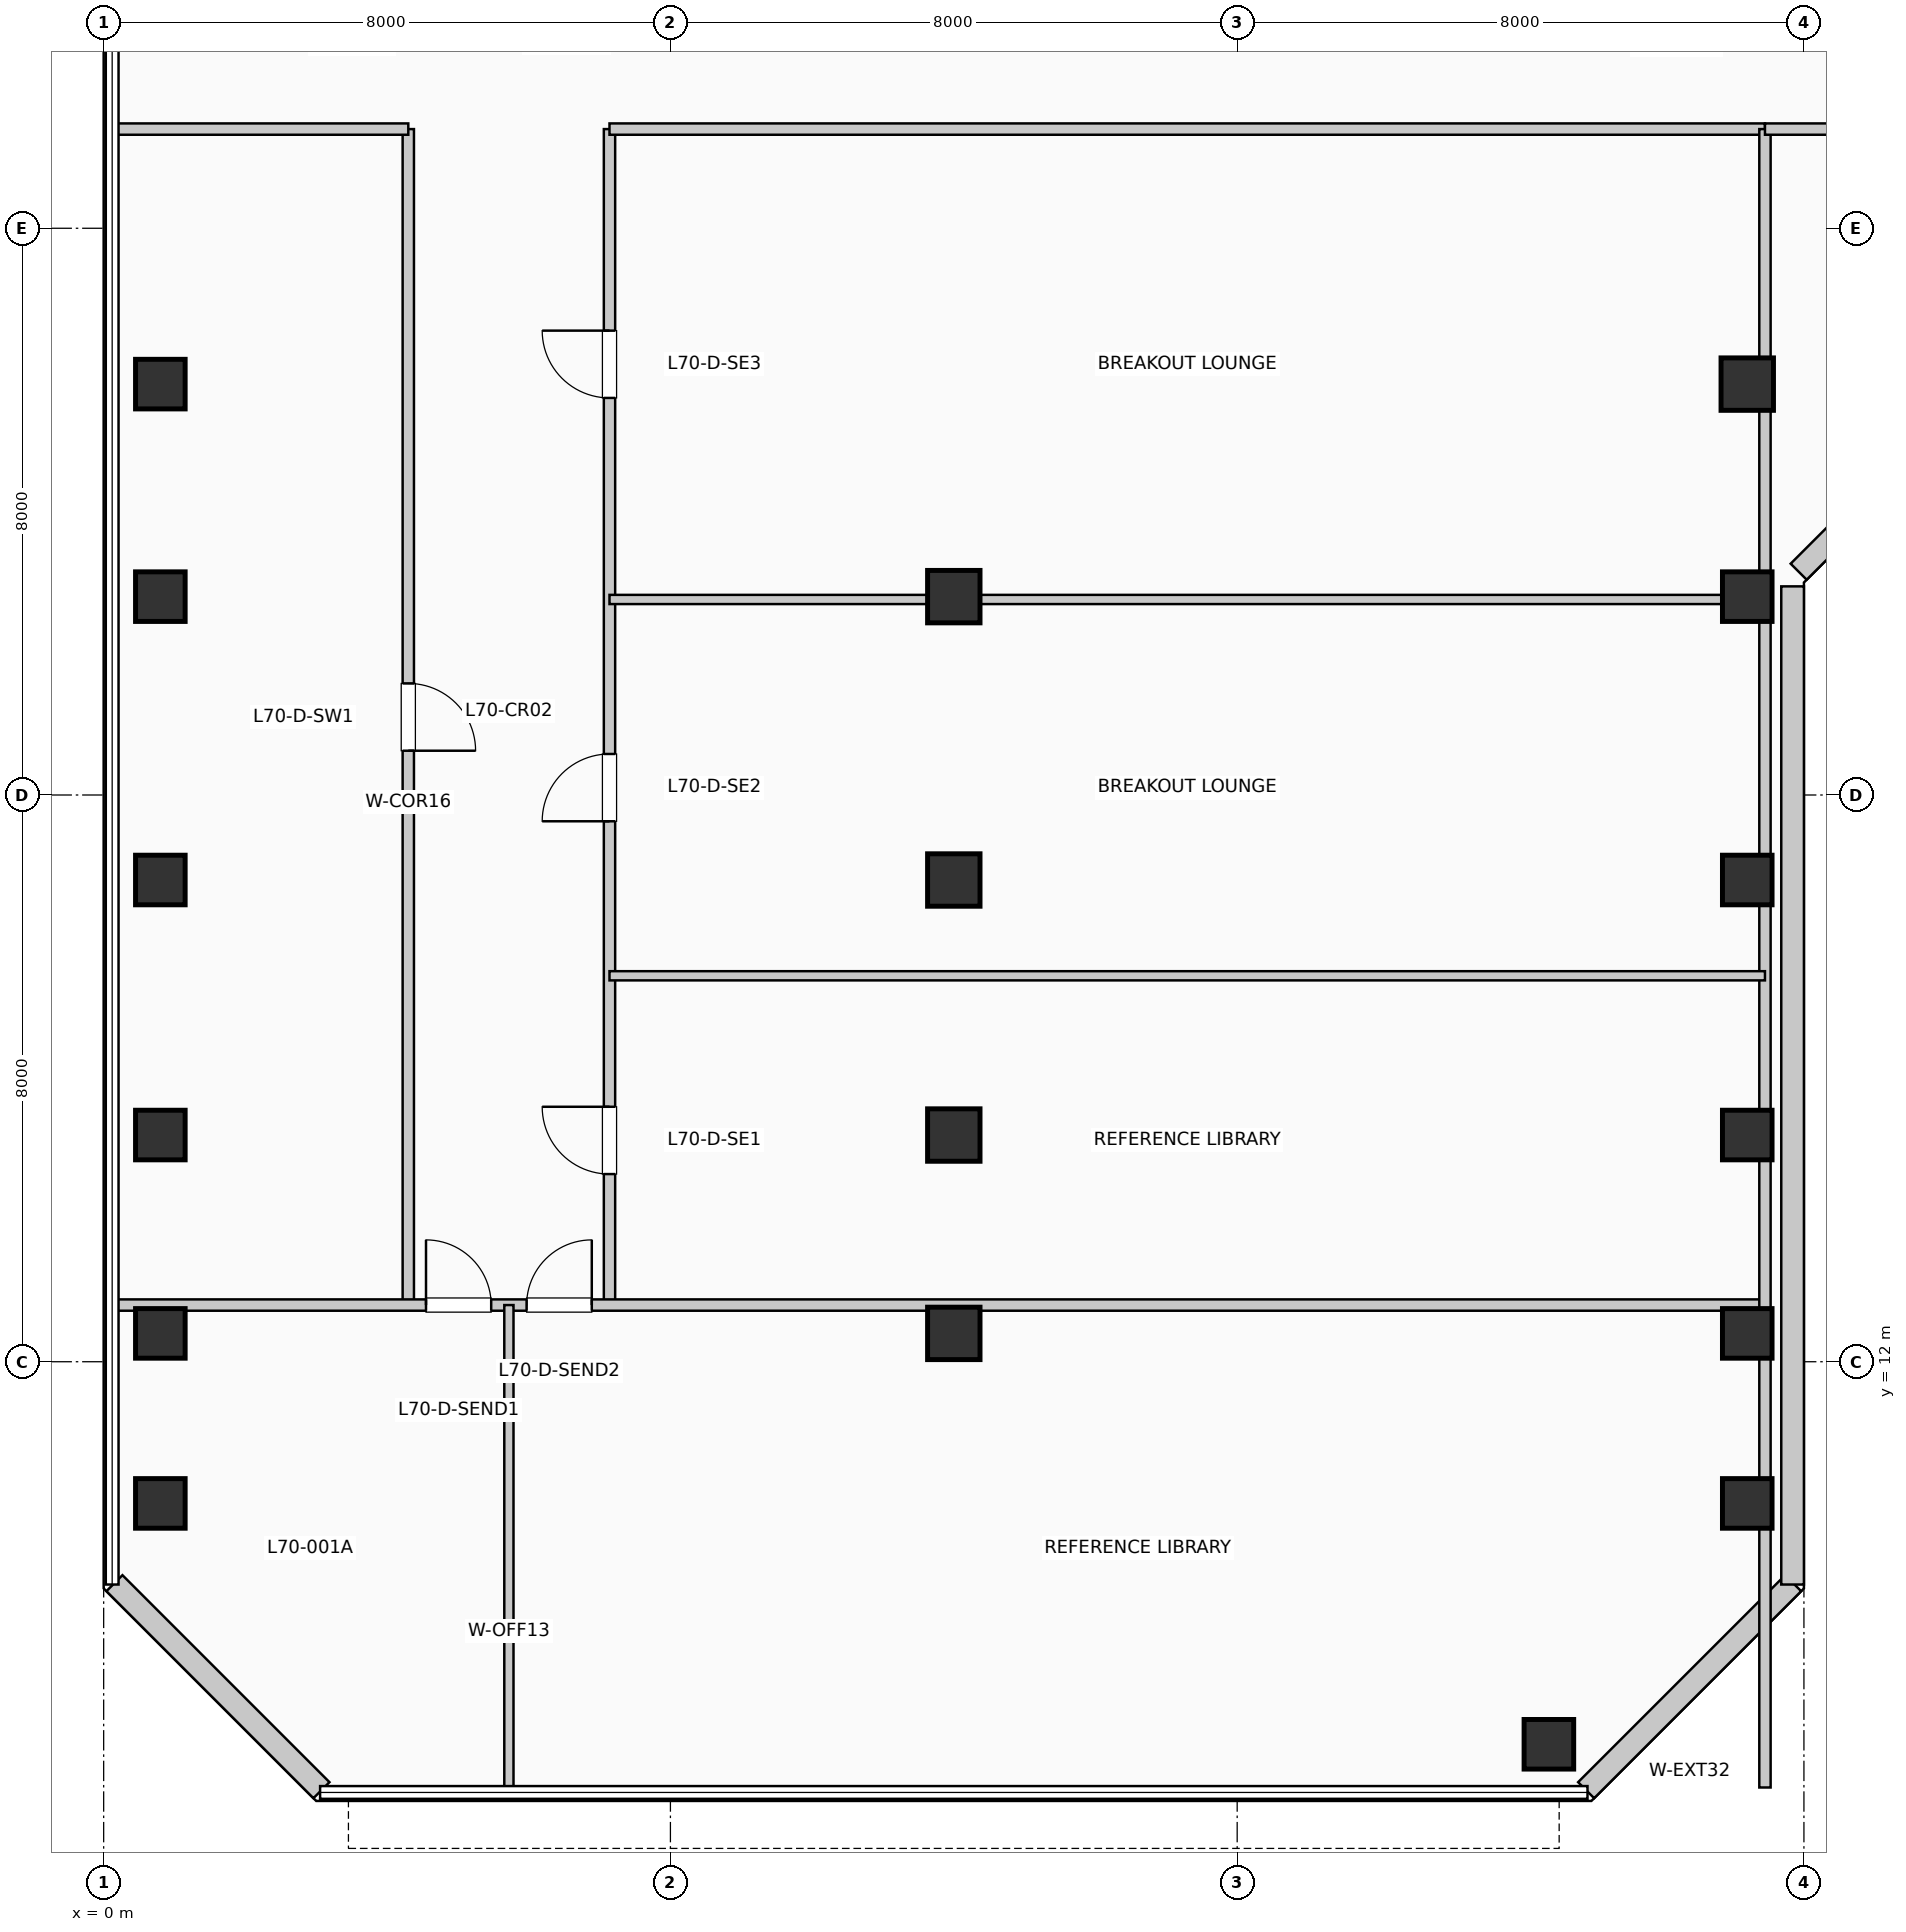
"""IFC4 building model, lengths in metres.
Left out: names, types, materials, properties, quantities, classifications, styles, units other than length and angle.
Written with IfcOpenShell. Run it as: python <this file> out.ifc"""

import sys

from ifc_helpers import new_model, si_unit, direction, frame, frame_2d, origin, origin_2d, place, context, subcontext, project, spatial, rectangle, extrude, element, fill, save


model = new_model("IFC4")
c1 = context("Model", 3, precision=1e-05, world=origin(), true_north=direction((0.0, 1.0)))
c2 = subcontext(c1, "Body", "Model", "MODEL_VIEW")
j1 = project(units=[si_unit("LENGTHUNIT", "METRE"), si_unit("PLANEANGLEUNIT", "RADIAN")], contexts=[c1])
p1 = place(None, origin())
s1 = spatial("IfcSite", under=j1, at=p1, CompositionType="ELEMENT")
p2 = place(p1, origin())
s2 = spatial("IfcBuilding", under=s1, at=p2, CompositionType="ELEMENT")
p3 = place(p2, frame((0.0, 0.0, 288.09)))
s3 = spatial("IfcBuildingStorey", under=s2, at=p3, CompositionType="ELEMENT", Elevation=288.09)
for number, where, z_axis, x_axis in (
    (1, (0.8, 10.0, 0.0), (0.0, 0.0, 1.0), (1.0, 0.0, 0.0)),
    (2, (0.8, 12.4, 0.0), (0.0, 0.0, 1.0), (1.0, 0.0, 0.0)),
    (3, (0.8, 15.2, 0.0), (0.0, 0.0, 1.0), (1.0, 0.0, 0.0)),
    (4, (0.8, 18.8, 0.0), (0.0, 0.0, 1.0), (1.0, 0.0, 0.0)),
    (5, (0.8, 22.8, 0.0), (0.0, 0.0, 1.0), (1.0, 0.0, 0.0)),
    (6, (0.8, 25.8, 0.0), (0.0, 0.0, 1.0), (1.0, 0.0, 0.0)),
):
    element("IfcColumn", number, at=place(p3, frame(where, z_axis=z_axis, x_axis=x_axis)), inside=s3, PredefinedType="COLUMN", context=c2, shape_type="SweptSolid", body=[
        extrude(rectangle(XDim=0.7, YDim=0.7, at=origin_2d()), origin(), (0.0, 0.0, 1.0), 3.96),
    ])
for number, where, z_axis, x_axis in (
    (7, (12.0, 12.4, 0.0), (0.0, 0.0, 1.0), (1.0, 0.0, 0.0)),
    (8, (12.0, 15.2, 0.0), (0.0, 0.0, 1.0), (1.0, 0.0, 0.0)),
    (9, (12.0, 18.8, 0.0), (0.0, 0.0, 1.0), (1.0, 0.0, 0.0)),
    (10, (12.0, 22.8, 0.0), (0.0, 0.0, 1.0), (1.0, 0.0, 0.0)),
):
    element("IfcColumn", number, at=place(p3, frame(where, z_axis=z_axis, x_axis=x_axis)), inside=s3, PredefinedType="COLUMN", context=c2, shape_type="SweptSolid", body=[
        extrude(rectangle(XDim=0.74, YDim=0.74, at=origin_2d()), origin(), (0.0, 0.0, 1.0), 3.96),
    ])
for number, where, z_axis, x_axis in (
    (11, (20.4, 6.6, 0.0), (0.0, 0.0, 1.0), (1.0, 0.0, 0.0)),
    (12, (23.2, 10.0, 0.0), (0.0, 0.0, 1.0), (1.0, 0.0, 0.0)),
    (13, (23.2, 12.4, 0.0), (0.0, 0.0, 1.0), (1.0, 0.0, 0.0)),
    (14, (23.2, 15.2, 0.0), (0.0, 0.0, 1.0), (1.0, 0.0, 0.0)),
    (15, (23.2, 18.8, 0.0), (0.0, 0.0, 1.0), (1.0, 0.0, 0.0)),
    (16, (23.2, 22.8, 0.0), (0.0, 0.0, 1.0), (1.0, 0.0, 0.0)),
):
    element("IfcColumn", number, at=place(p3, frame(where, z_axis=z_axis, x_axis=x_axis)), inside=s3, PredefinedType="COLUMN", context=c2, shape_type="SweptSolid", body=[
        extrude(rectangle(XDim=0.7, YDim=0.7, at=origin_2d()), origin(), (0.0, 0.0, 1.0), 3.96),
    ])
p4 = place(p3, frame((23.2, 25.8, 0.0), z_axis=(0.0, 0.0, 1.0), x_axis=(1.0, 0.0, 0.0)))
e17 = element("IfcColumn", 17, at=p4, inside=s3, PredefinedType="COLUMN", context=c2, shape_type="SweptSolid", body=[
    extrude(rectangle(XDim=0.74, YDim=0.74, at=origin_2d()), origin(), (0.0, 0.0, 1.0), 3.96),
])
p5 = place(p3, frame((20.926, 5.952, 0.0), z_axis=(0.0, 0.0, 1.0), x_axis=(0.707077242712, 0.707136318428, 0.0)))
e18 = element("IfcWall", 18, at=p5, inside=s3, PredefinedType="SOLIDWALL", context=c2, shape_type="SweptSolid", body=[
    extrude(rectangle(XDim=4.133, YDim=0.32, at=frame_2d((2.066, 0.0))), origin(), (0.0, 0.0, 1.0), 3.74),
])
p6 = place(p3, frame((23.84, 8.855, 0.0), z_axis=(0.0, 0.0, 1.0), x_axis=(0.0, 1.0, 0.0)))
e19 = element("IfcWall", 19, at=p6, inside=s3, PredefinedType="SOLIDWALL", context=c2, shape_type="SweptSolid", body=[
    extrude(rectangle(XDim=14.09, YDim=0.32, at=frame_2d((7.045, 0.0))), origin(), (0.0, 0.0, 1.0), 3.74),
])
p7 = place(p3, frame((23.926, 23.152, 0.0), z_axis=(0.0, 0.0, 1.0), x_axis=(0.707106781187, 0.707106781187, 0.0)))
e20 = element("IfcWall", 20, at=p7, inside=s3, PredefinedType="SOLIDWALL", context=c2, shape_type="SweptSolid", body=[
    extrude(rectangle(XDim=2.718, YDim=0.32, at=frame_2d((1.359, 0.0))), origin(), (0.0, 0.0, 1.0), 3.74),
])
p8 = place(p3, frame((0.152, 8.874, 0.0), z_axis=(0.0, 0.0, 1.0), x_axis=(0.707077242712, -0.707136318428, 0.0)))
e21 = element("IfcWall", 21, at=p8, inside=s3, PredefinedType="SOLIDWALL", context=c2, shape_type="SweptSolid", body=[
    extrude(rectangle(XDim=4.133, YDim=0.32, at=frame_2d((2.066, 0.0))), origin(), (0.0, 0.0, 1.0), 3.74),
])
p9 = place(p3, frame((4.3, 12.8, 0.0), z_axis=(0.0, 0.0, 1.0), x_axis=(0.0, 1.0, 0.0)))
e22 = element("IfcWall", 22, at=p9, inside=s3, PredefinedType="PARTITIONING", context=c2, shape_type="SweptSolid", body=[
    extrude(rectangle(XDim=16.6, YDim=0.16, at=frame_2d((8.3, 0.0))), origin(), (0.0, 0.0, 1.0), 3.74),
])
p10 = place(p9, frame((8.775, 0.0, 0.0), z_axis=(0.0, 0.0, 1.0), x_axis=(-1.0, 0.0, 0.0)))
e23 = element("IfcOpeningElement", 23, at=p10, cuts=e22, PredefinedType="OPENING", context=c2, shape_type="SweptSolid", body=[
    extrude(rectangle(XDim=0.95, YDim=2.15, at=frame_2d((0.475, 1.075))), frame((0.0, 0.09, 0.0), z_axis=(0.0, -1.0, 0.0), x_axis=(1.0, 0.0, 0.0)), (0.0, 0.0, 1.0), 0.18),
])
p11 = place(p3, frame((7.14, 12.8, 0.0), z_axis=(0.0, 0.0, 1.0), x_axis=(0.0, 1.0, 0.0)))
e24 = element("IfcWall", 24, at=p11, inside=s3, PredefinedType="PARTITIONING", context=c2, shape_type="SweptSolid", body=[
    extrude(rectangle(XDim=16.6, YDim=0.16, at=frame_2d((8.3, 0.0))), origin(), (0.0, 0.0, 1.0), 3.74),
])
p12 = place(p11, frame((1.849, 0.0, 0.0)))
e25 = element("IfcOpeningElement", 25, at=p12, cuts=e24, PredefinedType="OPENING", context=c2, shape_type="SweptSolid", body=[
    extrude(rectangle(XDim=0.95, YDim=2.15, at=frame_2d((0.475, 1.075))), frame((0.0, 0.09, 0.0), z_axis=(0.0, -1.0, 0.0), x_axis=(1.0, 0.0, 0.0)), (0.0, 0.0, 1.0), 0.18),
])
p13 = place(p11, frame((6.829, 0.0, 0.0)))
e26 = element("IfcOpeningElement", 26, at=p13, cuts=e24, PredefinedType="OPENING", context=c2, shape_type="SweptSolid", body=[
    extrude(rectangle(XDim=0.95, YDim=2.15, at=frame_2d((0.475, 1.075))), frame((0.0, 0.09, 0.0), z_axis=(0.0, -1.0, 0.0), x_axis=(1.0, 0.0, 0.0)), (0.0, 0.0, 1.0), 0.18),
])
p14 = place(p11, frame((12.805, 0.0, 0.0)))
e27 = element("IfcOpeningElement", 27, at=p14, cuts=e24, PredefinedType="OPENING", context=c2, shape_type="SweptSolid", body=[
    extrude(rectangle(XDim=0.95, YDim=2.15, at=frame_2d((0.475, 1.075))), frame((0.0, 0.09, 0.0), z_axis=(0.0, -1.0, 0.0), x_axis=(1.0, 0.0, 0.0)), (0.0, 0.0, 1.0), 0.18),
])
p15 = place(p3, frame((0.19, 12.8, 0.0), z_axis=(0.0, 0.0, 1.0), x_axis=(1.0, 0.0, 0.0)))
e28 = element("IfcWall", 28, at=p15, inside=s3, PredefinedType="PARTITIONING", context=c2, shape_type="SweptSolid", body=[
    extrude(rectangle(XDim=23.26, YDim=0.16, at=frame_2d((11.63, 0.0))), origin(), (0.0, 0.0, 1.0), 3.175),
])
p16 = place(p15, frame((4.36, 0.0, 0.0)))
e29 = element("IfcOpeningElement", 29, at=p16, cuts=e28, PredefinedType="OPENING", context=c2, shape_type="SweptSolid", body=[
    extrude(rectangle(XDim=0.92, YDim=2.1, at=frame_2d((0.46, 1.05))), frame((0.0, 0.09, 0.0), z_axis=(0.0, -1.0, 0.0), x_axis=(1.0, 0.0, 0.0)), (0.0, 0.0, 1.0), 0.18),
])
p17 = place(p15, frame((5.78, 0.0, 0.0)))
e30 = element("IfcOpeningElement", 30, at=p17, cuts=e28, PredefinedType="OPENING", context=c2, shape_type="SweptSolid", body=[
    extrude(rectangle(XDim=0.92, YDim=2.1, at=frame_2d((0.46, 1.05))), frame((0.0, 0.09, 0.0), z_axis=(0.0, -1.0, 0.0), x_axis=(1.0, 0.0, 0.0)), (0.0, 0.0, 1.0), 0.18),
])
p18 = place(p3, frame((0.19, 29.4, 0.0), z_axis=(0.0, 0.0, 1.0), x_axis=(1.0, 0.0, 0.0)))
e31 = element("IfcWall", 31, at=p18, inside=s3, PredefinedType="PARTITIONING", context=c2, shape_type="SweptSolid", body=[
    extrude(rectangle(XDim=4.11, YDim=0.16, at=frame_2d((2.055, 0.0))), origin(), (0.0, 0.0, 1.0), 3.425),
])
p19 = place(p3, frame((7.14, 29.4, 0.0), z_axis=(0.0, 0.0, 1.0), x_axis=(1.0, 0.0, 0.0)))
e32 = element("IfcWall", 32, at=p19, inside=s3, PredefinedType="PARTITIONING", context=c2, shape_type="SweptSolid", body=[
    extrude(rectangle(XDim=16.31, YDim=0.16, at=frame_2d((8.155, 0.0))), origin(), (0.0, 0.0, 1.0), 3.425),
])
p20 = place(p3, frame((23.45, 5.99, 0.0), z_axis=(0.0, 0.0, 1.0), x_axis=(0.0, 1.0, 0.0)))
e33 = element("IfcWall", 33, at=p20, inside=s3, PredefinedType="PARTITIONING", context=c2, shape_type="SweptSolid", body=[
    extrude(rectangle(XDim=23.41, YDim=0.16, at=frame_2d((11.705, 0.0))), origin(), (0.0, 0.0, 1.0), 3.175),
])
p21 = place(p3, frame((5.72, 5.99, 0.0), z_axis=(0.0, 0.0, 1.0), x_axis=(0.0, 1.0, 0.0)))
e34 = element("IfcWall", 34, at=p21, inside=s3, PredefinedType="PARTITIONING", context=c2, shape_type="SweptSolid", body=[
    extrude(rectangle(XDim=6.81, YDim=0.13, at=frame_2d((3.405, 0.0))), origin(), (0.0, 0.0, 1.0), 3.74),
])
p22 = place(p3, frame((7.14, 17.448, 0.0), z_axis=(0.0, 0.0, 1.0), x_axis=(1.0, 0.0, 0.0)))
e35 = element("IfcWall", 35, at=p22, inside=s3, PredefinedType="PARTITIONING", context=c2, shape_type="SweptSolid", body=[
    extrude(rectangle(XDim=16.31, YDim=0.13, at=frame_2d((8.155, 0.0))), origin(), (0.0, 0.0, 1.0), 3.74),
])
p23 = place(p3, frame((7.14, 22.76, 0.0), z_axis=(0.0, 0.0, 1.0), x_axis=(1.0, 0.0, 0.0)))
e36 = element("IfcWall", 36, at=p23, inside=s3, PredefinedType="PARTITIONING", context=c2, shape_type="SweptSolid", body=[
    extrude(rectangle(XDim=16.31, YDim=0.13, at=frame_2d((8.155, 0.0))), origin(), (0.0, 0.0, 1.0), 3.175),
])
p24 = place(p3, frame((23.45, 29.4, 0.0), z_axis=(0.0, 0.0, 1.0), x_axis=(1.0, 0.0, 0.0)))
e37 = element("IfcWall", 37, at=p24, inside=s3, PredefinedType="PARTITIONING", context=c2, shape_type="SweptSolid", body=[
    extrude(rectangle(XDim=20.76, YDim=0.16, at=frame_2d((10.38, 0.0))), origin(), (0.0, 0.0, 1.0), 3.425),
])
p25 = place(p24, frame((2.966, 0.0, 0.0), z_axis=(0.0, 0.0, 1.0), x_axis=(-1.0, 0.0, 0.0)))
e38 = element("IfcOpeningElement", 38, at=p25, cuts=e37, PredefinedType="OPENING", context=c2, shape_type="SweptSolid", body=[
    extrude(rectangle(XDim=0.95, YDim=2.15, at=frame_2d((0.475, 1.075))), frame((0.0, 0.09, 0.0), z_axis=(0.0, -1.0, 0.0), x_axis=(1.0, 0.0, 0.0)), (0.0, 0.0, 1.0), 0.18),
])
p26 = place(p24, frame((8.364, 0.0, 0.0), z_axis=(0.0, 0.0, 1.0), x_axis=(-1.0, 0.0, 0.0)))
e39 = element("IfcOpeningElement", 39, at=p26, cuts=e37, PredefinedType="OPENING", context=c2, shape_type="SweptSolid", body=[
    extrude(rectangle(XDim=0.95, YDim=2.15, at=frame_2d((0.475, 1.075))), frame((0.0, 0.09, 0.0), z_axis=(0.0, -1.0, 0.0), x_axis=(1.0, 0.0, 0.0)), (0.0, 0.0, 1.0), 0.18),
])
p27 = place(p24, frame((14.177, 0.0, 0.0), z_axis=(0.0, 0.0, 1.0), x_axis=(-1.0, 0.0, 0.0)))
e40 = element("IfcOpeningElement", 40, at=p27, cuts=e37, PredefinedType="OPENING", context=c2, shape_type="SweptSolid", body=[
    extrude(rectangle(XDim=0.95, YDim=2.15, at=frame_2d((0.475, 1.075))), frame((0.0, 0.09, 0.0), z_axis=(0.0, -1.0, 0.0), x_axis=(1.0, 0.0, 0.0)), (0.0, 0.0, 1.0), 0.18),
])
p28 = place(p24, frame((19.159, 0.0, 0.0), z_axis=(0.0, 0.0, 1.0), x_axis=(-1.0, 0.0, 0.0)))
e41 = element("IfcOpeningElement", 41, at=p28, cuts=e37, PredefinedType="OPENING", context=c2, shape_type="SweptSolid", body=[
    extrude(rectangle(XDim=0.95, YDim=2.15, at=frame_2d((0.475, 1.075))), frame((0.0, 0.09, 0.0), z_axis=(0.0, -1.0, 0.0), x_axis=(1.0, 0.0, 0.0)), (0.0, 0.0, 1.0), 0.18),
])
p29 = place(p16, origin())
e42 = element("IfcDoor", 42, at=p29, inside=s3, OperationType="SINGLE_SWING_LEFT", PredefinedType="DOOR", context=c2, shape_type="SweptSolid", body=[
    extrude(rectangle(XDim=0.92, YDim=2.1, at=frame_2d((0.46, 1.05))), frame((0.0, 0.025, 0.0), z_axis=(0.0, -1.0, 0.0), x_axis=(1.0, 0.0, 0.0)), (0.0, 0.0, 1.0), 0.05),
])
fill(e29, e42)
p30 = place(p17, origin())
e43 = element("IfcDoor", 43, at=p30, inside=s3, OperationType="SINGLE_SWING_RIGHT", PredefinedType="DOOR", context=c2, shape_type="SweptSolid", body=[
    extrude(rectangle(XDim=0.92, YDim=2.1, at=frame_2d((0.46, 1.05))), frame((0.0, 0.025, 0.0), z_axis=(0.0, -1.0, 0.0), x_axis=(1.0, 0.0, 0.0)), (0.0, 0.0, 1.0), 0.05),
])
fill(e30, e43)
p31 = place(p10, origin())
e44 = element("IfcDoor", 44, at=p31, inside=s3, OperationType="SINGLE_SWING_LEFT", PredefinedType="DOOR", context=c2, shape_type="SweptSolid", body=[
    extrude(rectangle(XDim=0.95, YDim=2.15, at=frame_2d((0.475, 1.075))), frame((0.0, 0.025, 0.0), z_axis=(0.0, -1.0, 0.0), x_axis=(1.0, 0.0, 0.0)), (0.0, 0.0, 1.0), 0.05),
])
fill(e23, e44)
p32 = place(p12, origin())
e45 = element("IfcDoor", 45, at=p32, inside=s3, OperationType="SINGLE_SWING_RIGHT", PredefinedType="DOOR", context=c2, shape_type="SweptSolid", body=[
    extrude(rectangle(XDim=0.95, YDim=2.15, at=frame_2d((0.475, 1.075))), frame((0.0, 0.025, 0.0), z_axis=(0.0, -1.0, 0.0), x_axis=(1.0, 0.0, 0.0)), (0.0, 0.0, 1.0), 0.05),
])
fill(e25, e45)
p33 = place(p13, origin())
e46 = element("IfcDoor", 46, at=p33, inside=s3, OperationType="SINGLE_SWING_LEFT", PredefinedType="DOOR", context=c2, shape_type="SweptSolid", body=[
    extrude(rectangle(XDim=0.95, YDim=2.15, at=frame_2d((0.475, 1.075))), frame((0.0, 0.025, 0.0), z_axis=(0.0, -1.0, 0.0), x_axis=(1.0, 0.0, 0.0)), (0.0, 0.0, 1.0), 0.05),
])
fill(e26, e46)
p34 = place(p14, origin())
e47 = element("IfcDoor", 47, at=p34, inside=s3, OperationType="SINGLE_SWING_RIGHT", PredefinedType="DOOR", context=c2, shape_type="SweptSolid", body=[
    extrude(rectangle(XDim=0.95, YDim=2.15, at=frame_2d((0.475, 1.075))), frame((0.0, 0.025, 0.0), z_axis=(0.0, -1.0, 0.0), x_axis=(1.0, 0.0, 0.0)), (0.0, 0.0, 1.0), 0.05),
])
fill(e27, e47)
save(model, sys.argv[1])
